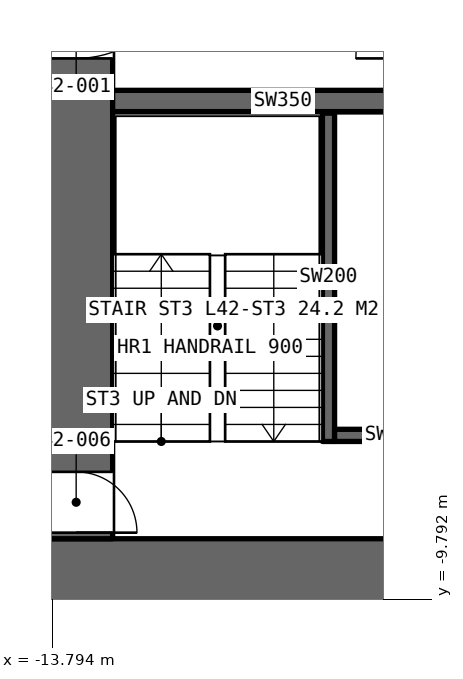
"""IFC4 building model, lengths in metres.
Left out: names, types, materials, properties, quantities, classifications, styles, units other than length and angle.
Written with IfcOpenShell. Run it as: python <this file> out.ifc"""

import sys

from ifc_helpers import new_model, si_unit, direction, frame, frame_2d, origin, place, context, subcontext, project, spatial, rectangle, extrude, element, fill, save


model = new_model("IFC4")
c1 = context("Model", 3, precision=1e-05, world=origin(), true_north=direction((0.0, 1.0)))
c2 = subcontext(c1, "Body", "Model", "MODEL_VIEW")
j1 = project(units=[si_unit("LENGTHUNIT", "METRE"), si_unit("PLANEANGLEUNIT", "RADIAN")], contexts=[c1])
p1 = place(None, origin())
s1 = spatial("IfcSite", under=j1, at=p1, CompositionType="ELEMENT")
p2 = place(p1, origin())
s2 = spatial("IfcBuilding", under=s1, at=p2, CompositionType="ELEMENT")
p3 = place(p2, frame((0.0, 0.0, 194.8)))
s3 = spatial("IfcBuildingStorey", under=s2, at=p3, CompositionType="ELEMENT", Elevation=194.8)
p4 = place(p3, frame((-14.0, -9.4, 0.0), z_axis=(0.0, 0.0, 1.0), x_axis=(1.0, 0.0, 0.0)))
e1 = element("IfcWall", 1, at=p4, inside=s3, PredefinedType="SHEAR", context=c2, shape_type="SweptSolid", body=[
    extrude(rectangle(XDim=28.0, YDim=1.2, at=frame_2d((14.0, 0.0))), origin(), (0.0, 0.0, 1.0), 4.2),
])
p5 = place(p4, frame((22.9, 0.0, 0.0)))
e2 = element("IfcOpeningElement", 2, at=p5, cuts=e1, PredefinedType="OPENING", context=c2, shape_type="SweptSolid", body=[
    extrude(rectangle(XDim=2.2, YDim=2.7, at=frame_2d((1.1, 1.35))), frame((0.0, 0.61, 0.0), z_axis=(0.0, -1.0, 0.0), x_axis=(1.0, 0.0, 0.0)), (0.0, 0.0, 1.0), 1.22),
])
p6 = place(p3, frame((-13.4, 8.8, 0.0), z_axis=(0.0, 0.0, 1.0), x_axis=(0.0, -1.0, 0.0)))
e3 = element("IfcWall", 3, at=p6, inside=s3, PredefinedType="SHEAR", context=c2, shape_type="SweptSolid", body=[
    extrude(rectangle(XDim=17.6, YDim=1.2, at=frame_2d((8.8, 0.0))), origin(), (0.0, 0.0, 1.0), 4.2),
])
p7 = place(p6, frame((7.9, 0.0, 0.0)))
e4 = element("IfcOpeningElement", 4, at=p7, cuts=e3, PredefinedType="OPENING", context=c2, shape_type="SweptSolid", body=[
    extrude(rectangle(XDim=1.8, YDim=2.4, at=frame_2d((0.9, 1.2))), frame((0.0, 0.61, 0.0), z_axis=(0.0, -1.0, 0.0), x_axis=(1.0, 0.0, 0.0)), (0.0, 0.0, 1.0), 1.22),
])
p8 = place(p6, frame((16.5, 0.0, 0.0)))
e5 = element("IfcOpeningElement", 5, at=p8, cuts=e3, PredefinedType="OPENING", context=c2, shape_type="SweptSolid", body=[
    extrude(rectangle(XDim=1.0, YDim=2.4, at=frame_2d((0.5, 1.2))), frame((0.0, 0.61, 0.0), z_axis=(0.0, -1.0, 0.0), x_axis=(1.0, 0.0, 0.0)), (0.0, 0.0, 1.0), 1.22),
])
p9 = place(p3, frame((-12.8, -1.6, 0.0), z_axis=(0.0, 0.0, 1.0), x_axis=(1.0, 0.0, 0.0)))
e6 = element("IfcWall", 6, at=p9, inside=s3, PredefinedType="SHEAR", context=c2, shape_type="SweptSolid", body=[
    extrude(rectangle(XDim=5.6, YDim=0.35, at=frame_2d((2.8, 0.0))), origin(), (0.0, 0.0, 1.0), 4.2),
])
p10 = place(p3, frame((-9.25, -7.2, 0.0), z_axis=(0.0, 0.0, 1.0), x_axis=(0.0, 1.0, 0.0)))
e7 = element("IfcWall", 7, at=p10, inside=s3, PredefinedType="SOLIDWALL", context=c2, shape_type="SweptSolid", body=[
    extrude(rectangle(XDim=5.4, YDim=0.2, at=frame_2d((2.7, 0.0))), origin(), (0.0, 0.0, 1.0), 4.2),
])
p11 = place(p3, frame((-9.15, -7.1, 0.0), z_axis=(0.0, 0.0, 1.0), x_axis=(1.0, 0.0, 0.0)))
e8 = element("IfcWall", 8, at=p11, inside=s3, PredefinedType="SOLIDWALL", context=c2, shape_type="SweptSolid", body=[
    extrude(rectangle(XDim=1.95, YDim=0.2, at=frame_2d((0.975, 0.0))), origin(), (0.0, 0.0, 1.0), 4.2),
])
p12 = place(p7, origin())
e9 = element("IfcDoor", 9, at=p12, inside=s3, OperationType="DOUBLE_DOOR_SINGLE_SWING", PredefinedType="DOOR", context=c2, shape_type="SweptSolid", body=[
    extrude(rectangle(XDim=1.8, YDim=2.4, at=frame_2d((0.9, 1.2))), frame((0.0, 0.025, 0.0), z_axis=(0.0, -1.0, 0.0), x_axis=(1.0, 0.0, 0.0)), (0.0, 0.0, 1.0), 0.05),
])
fill(e4, e9)
p13 = place(p8, origin())
e10 = element("IfcDoor", 10, at=p13, inside=s3, OperationType="SINGLE_SWING_RIGHT", PredefinedType="DOOR", context=c2, shape_type="SweptSolid", body=[
    extrude(rectangle(XDim=1.0, YDim=2.4, at=frame_2d((0.5, 1.2))), frame((0.0, 0.025, 0.0), z_axis=(0.0, -1.0, 0.0), x_axis=(1.0, 0.0, 0.0)), (0.0, 0.0, 1.0), 0.05),
])
fill(e5, e10)
save(model, sys.argv[1])
